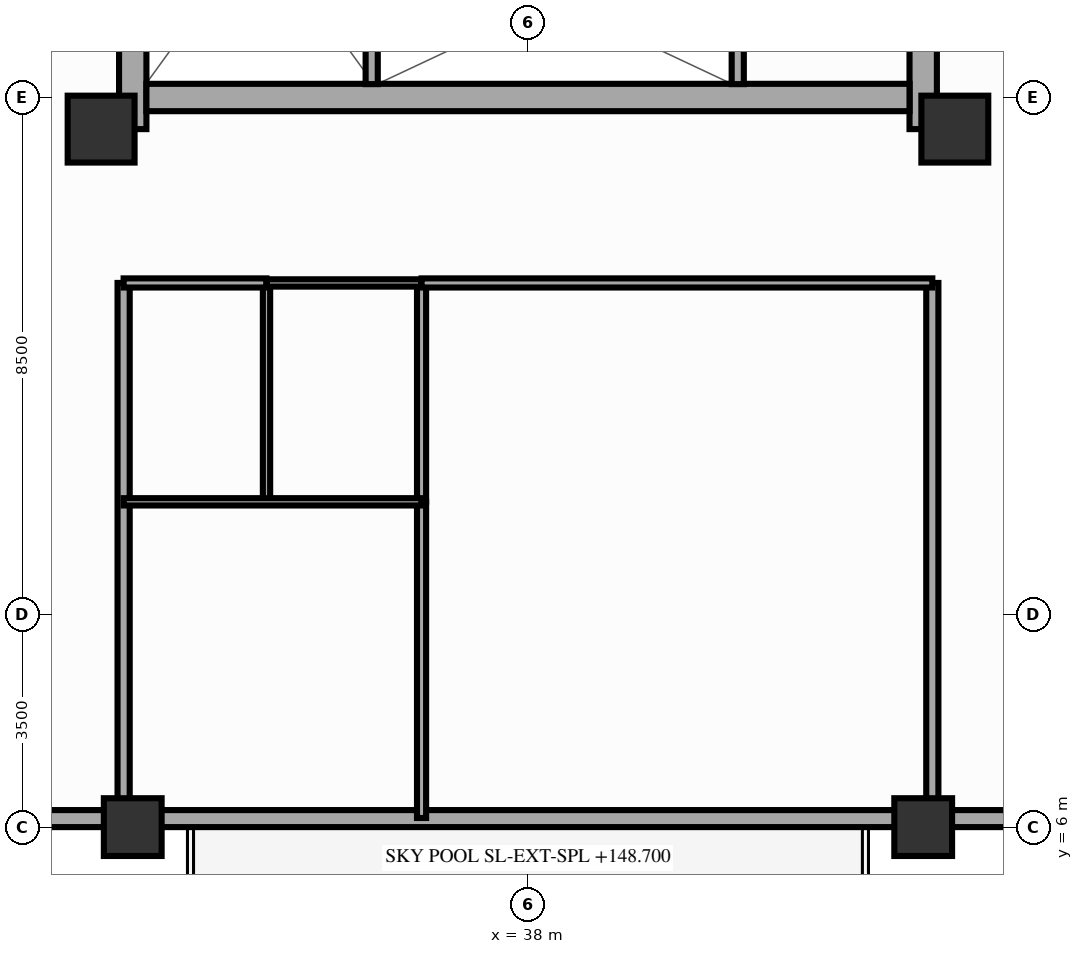
"""IFC4 building model, lengths in metres.
Left out: names, types, materials, properties, quantities, classifications, styles, units other than length and angle.
Written with IfcOpenShell. Run it as: python <this file> out.ifc"""

import sys

from ifc_helpers import new_model, si_unit, direction, frame, frame_2d, origin, origin_2d, place, context, subcontext, project, spatial, rectangle, extrude, source, transform, mapped, element, fill, save


model = new_model("IFC4")
c1 = context("Model", 3, precision=1e-05, world=origin(), true_north=direction((0.0, 1.0)))
c2 = subcontext(c1, "Body", "Model", "MODEL_VIEW")
j1 = project(units=[si_unit("LENGTHUNIT", "METRE"), si_unit("PLANEANGLEUNIT", "RADIAN")], contexts=[c1])
p1 = place(None, origin())
s1 = spatial("IfcSite", under=j1, at=p1, CompositionType="ELEMENT")
p2 = place(p1, origin())
s2 = spatial("IfcBuilding", under=s1, at=p2, CompositionType="ELEMENT")
p3 = place(p2, frame((0.0, 0.0, 148.7)))
s3 = spatial("IfcBuildingStorey", under=s2, at=p3, CompositionType="ELEMENT", Elevation=148.7)
p4 = place(p3, frame((31.5, 17.48, 0.0), z_axis=(0.0, 0.0, 1.0), x_axis=(0.0, 1.0, 0.0)))
e1 = element("IfcWall", 1, at=p4, inside=s3, PredefinedType="SHEAR", context=c2, shape_type="SweptSolid", body=[
    extrude(rectangle(XDim=19.04, YDim=0.45, at=frame_2d((9.52, 0.0))), origin(), (0.0, 0.0, 1.0), 3.5),
])
p5 = place(p4, frame((6.32, 0.0, 0.0)))
e2 = element("IfcOpeningElement", 2, at=p5, cuts=e1, PredefinedType="OPENING", context=c2, shape_type="SweptSolid", body=[
    extrude(rectangle(XDim=1.1, YDim=2.15, at=frame_2d((0.55, 1.075))), frame((0.0, 0.237, 0.0), z_axis=(0.0, -1.0, 0.0), x_axis=(1.0, 0.0, 0.0)), (0.0, 0.0, 1.0), 0.474),
])
p6 = place(p3, frame((44.5, 17.48, 0.0), z_axis=(0.0, 0.0, 1.0), x_axis=(0.0, 1.0, 0.0)))
e3 = element("IfcWall", 3, at=p6, inside=s3, PredefinedType="SHEAR", context=c2, shape_type="SweptSolid", body=[
    extrude(rectangle(XDim=19.04, YDim=0.45, at=frame_2d((9.52, 0.0))), origin(), (0.0, 0.0, 1.0), 3.5),
])
p7 = place(p6, frame((12.67, 0.0, 0.0), z_axis=(0.0, 0.0, 1.0), x_axis=(-1.0, 0.0, 0.0)))
e4 = element("IfcOpeningElement", 4, at=p7, cuts=e3, PredefinedType="OPENING", context=c2, shape_type="SweptSolid", body=[
    extrude(rectangle(XDim=1.1, YDim=2.15, at=frame_2d((0.55, 1.075))), frame((0.0, 0.237, 0.0), z_axis=(0.0, -1.0, 0.0), x_axis=(1.0, 0.0, 0.0)), (0.0, 0.0, 1.0), 0.474),
])
p8 = place(p3, frame((31.725, 18.0, 0.0), z_axis=(0.0, 0.0, 1.0), x_axis=(1.0, 0.0, 0.0)))
e5 = element("IfcWall", 5, at=p8, inside=s3, PredefinedType="SHEAR", context=c2, shape_type="SweptSolid", body=[
    extrude(rectangle(XDim=12.55, YDim=0.45, at=frame_2d((6.275, 0.0))), origin(), (0.0, 0.0, 1.0), 3.5),
])
m1 = source(origin(), c2, "Body", "SweptSolid", [
    extrude(rectangle(XDim=1.1, YDim=1.1, at=origin_2d()), origin(), (0.0, 0.0, 1.0), 3.5),
])
for number, where, z_axis, x_axis in (
    (6, (30.98, 17.48, 0.0), (0.0, 0.0, 1.0), (1.0, 0.0, 0.0)),
    (7, (45.02, 17.48, 0.0), (0.0, 0.0, 1.0), (1.0, 0.0, 0.0)),
):
    element("IfcColumn", number, at=place(p3, frame(where, z_axis=z_axis, x_axis=x_axis)), inside=s3, PredefinedType="COLUMN", context=c2, shape_type="MappedRepresentation", body=[
        mapped(m1, transform((0.0, 0.0, 0.0), scale=1.0)),
    ])
m2 = source(origin(), c2, "Body", "SweptSolid", [
    extrude(rectangle(XDim=0.95, YDim=0.95, at=origin_2d()), origin(), (0.0, 0.0, 1.0), 3.5),
])
for number, where, z_axis, x_axis in (
    (8, (31.5, 6.0, 0.0), (0.0, 0.0, 1.0), (1.0, 0.0, 0.0)),
    (9, (44.5, 6.0, 0.0), (0.0, 0.0, 1.0), (1.0, 0.0, 0.0)),
):
    element("IfcColumn", number, at=place(p3, frame(where, z_axis=z_axis, x_axis=x_axis)), inside=s3, PredefinedType="COLUMN", context=c2, shape_type="MappedRepresentation", body=[
        mapped(m2, transform((0.0, 0.0, 0.0), scale=1.0)),
    ])
p9 = place(p3, frame((21.0, 6.14, 0.0), z_axis=(0.0, 0.0, 1.0), x_axis=(1.0, 0.0, 0.0)))
e10 = element("IfcWall", 10, at=p9, inside=s3, PredefinedType="SOLIDWALL", context=c2, shape_type="SweptSolid", body=[
    extrude(rectangle(XDim=34.0, YDim=0.28, at=frame_2d((17.0, 0.0))), origin(), (0.0, 0.0, 1.0), 2.39),
])
p10 = place(p9, frame((4.65, 0.0, 0.25)))
e11 = element("IfcOpeningElement", 11, at=p10, cuts=e10, PredefinedType="OPENING", context=c2, shape_type="SweptSolid", body=[
    extrude(rectangle(XDim=1.2, YDim=1.5, at=frame_2d((0.6, 0.75))), frame((0.0, 0.152, 0.0), z_axis=(0.0, -1.0, 0.0), x_axis=(1.0, 0.0, 0.0)), (0.0, 0.0, 1.0), 0.304),
])
p11 = place(p9, frame((12.433, 0.0, 0.25)))
e12 = element("IfcOpeningElement", 12, at=p11, cuts=e10, PredefinedType="OPENING", context=c2, shape_type="SweptSolid", body=[
    extrude(rectangle(XDim=1.2, YDim=1.5, at=frame_2d((0.6, 0.75))), frame((0.0, 0.152, 0.0), z_axis=(0.0, -1.0, 0.0), x_axis=(1.0, 0.0, 0.0)), (0.0, 0.0, 1.0), 0.304),
])
p12 = place(p9, frame((18.617, 0.0, 0.25)))
e13 = element("IfcOpeningElement", 13, at=p12, cuts=e10, PredefinedType="OPENING", context=c2, shape_type="SweptSolid", body=[
    extrude(rectangle(XDim=1.2, YDim=1.5, at=frame_2d((0.6, 0.75))), frame((0.0, 0.152, 0.0), z_axis=(0.0, -1.0, 0.0), x_axis=(1.0, 0.0, 0.0)), (0.0, 0.0, 1.0), 0.304),
])
p13 = place(p9, frame((28.15, 0.0, 0.25)))
e14 = element("IfcOpeningElement", 14, at=p13, cuts=e10, PredefinedType="OPENING", context=c2, shape_type="SweptSolid", body=[
    extrude(rectangle(XDim=1.2, YDim=1.5, at=frame_2d((0.6, 0.75))), frame((0.0, 0.152, 0.0), z_axis=(0.0, -1.0, 0.0), x_axis=(1.0, 0.0, 0.0)), (0.0, 0.0, 1.0), 0.304),
])
p14 = place(p9, frame((21.7, 0.0, 0.0), z_axis=(0.0, 0.0, 1.0), x_axis=(-1.0, 0.0, 0.0)))
e15 = element("IfcOpeningElement", 15, at=p14, cuts=e10, PredefinedType="OPENING", context=c2, shape_type="SweptSolid", body=[
    extrude(rectangle(XDim=1.1, YDim=2.15, at=frame_2d((0.55, 1.075))), frame((0.0, 0.152, 0.0), z_axis=(0.0, -1.0, 0.0), x_axis=(1.0, 0.0, 0.0)), (0.0, 0.0, 1.0), 0.304),
])
p15 = place(p3, frame((41.45, 18.22, 0.0), z_axis=(0.0, 0.0, 1.0), x_axis=(0.0, 1.0, 0.0)))
e16 = element("IfcWall", 16, at=p15, inside=s3, PredefinedType="PARTITIONING", context=c2, shape_type="SweptSolid", body=[
    extrude(rectangle(XDim=2.96, YDim=0.2, at=frame_2d((1.48, 0.0))), origin(), (0.0, 0.0, 1.0), 3.16),
])
p16 = place(p3, frame((35.43, 18.22, 0.0), z_axis=(0.0, 0.0, 1.0), x_axis=(0.0, 1.0, 0.0)))
e17 = element("IfcWall", 17, at=p16, inside=s3, PredefinedType="SOLIDWALL", context=c2, shape_type="SweptSolid", body=[
    extrude(rectangle(XDim=7.22, YDim=0.2, at=frame_2d((3.61, 0.0))), origin(), (0.0, 0.0, 1.0), 3.29),
])
p17 = place(p16, frame((6.68, 0.0, 0.0), z_axis=(0.0, 0.0, 1.0), x_axis=(-1.0, 0.0, 0.0)))
e18 = element("IfcOpeningElement", 18, at=p17, cuts=e17, PredefinedType="OPENING", context=c2, shape_type="SweptSolid", body=[
    extrude(rectangle(XDim=1.1, YDim=2.15, at=frame_2d((0.55, 1.075))), frame((0.0, 0.112, 0.0), z_axis=(0.0, -1.0, 0.0), x_axis=(1.0, 0.0, 0.0)), (0.0, 0.0, 1.0), 0.224),
])
for number, where, z_axis, x_axis in (
    (19, (31.35, 14.95, 0.0), (0.0, 0.0, 1.0), (0.0, -1.0, 0.0)),
    (20, (44.65, 14.95, 0.0), (0.0, 0.0, 1.0), (0.0, -1.0, 0.0)),
):
    element("IfcWall", number, at=place(p3, frame(where, z_axis=z_axis, x_axis=x_axis)), inside=s3, PredefinedType="PARTITIONING", context=c2, shape_type="SweptSolid", body=[
        extrude(rectangle(XDim=8.8, YDim=0.2, at=frame_2d((4.4, 0.0))), origin(), (0.0, 0.0, 1.0), 2.39),
    ])
p18 = place(p3, frame((33.7, 14.95, 0.0), z_axis=(0.0, 0.0, 1.0), x_axis=(0.0, -1.0, 0.0)))
e21 = element("IfcWall", 21, at=p18, inside=s3, PredefinedType="PARTITIONING", context=c2, shape_type="SweptSolid", body=[
    extrude(rectangle(XDim=3.6, YDim=0.12, at=frame_2d((1.8, 0.0))), origin(), (0.0, 0.0, 1.0), 3.16),
])
p19 = place(p3, frame((36.25, 14.95, 0.0), z_axis=(0.0, 0.0, 1.0), x_axis=(0.0, -1.0, 0.0)))
e22 = element("IfcWall", 22, at=p19, inside=s3, PredefinedType="PARTITIONING", context=c2, shape_type="SweptSolid", body=[
    extrude(rectangle(XDim=3.6, YDim=0.15, at=frame_2d((1.8, 0.0))), origin(), (0.0, 0.0, 1.0), 3.16),
])
p20 = place(p3, frame((36.25, 11.35, 0.0), z_axis=(0.0, 0.0, 1.0), x_axis=(0.0, -1.0, 0.0)))
e23 = element("IfcWall", 23, at=p20, inside=s3, PredefinedType="PARTITIONING", context=c2, shape_type="SweptSolid", body=[
    extrude(rectangle(XDim=5.2, YDim=0.15, at=frame_2d((2.6, 0.0))), origin(), (0.0, 0.0, 1.0), 3.16),
])
p21 = place(p20, frame((2.15, 0.0, 0.0)))
e24 = element("IfcOpeningElement", 24, at=p21, cuts=e23, PredefinedType="OPENING", context=c2, shape_type="SweptSolid", body=[
    extrude(rectangle(XDim=0.9, YDim=2.1, at=frame_2d((0.45, 1.05))), frame((0.0, 0.087, 0.0), z_axis=(0.0, -1.0, 0.0), x_axis=(1.0, 0.0, 0.0)), (0.0, 0.0, 1.0), 0.174),
])
p22 = place(p3, frame((31.35, 11.35, 0.0), z_axis=(0.0, 0.0, 1.0), x_axis=(1.0, 0.0, 0.0)))
e25 = element("IfcWall", 25, at=p22, inside=s3, PredefinedType="PARTITIONING", context=c2, shape_type="SweptSolid", body=[
    extrude(rectangle(XDim=4.9, YDim=0.12, at=frame_2d((2.45, 0.0))), origin(), (0.0, 0.0, 1.0), 2.89),
])
p23 = place(p3, frame((31.35, 14.95, 0.0), z_axis=(0.0, 0.0, 1.0), x_axis=(1.0, 0.0, 0.0)))
e26 = element("IfcWall", 26, at=p23, inside=s3, PredefinedType="PARTITIONING", context=c2, shape_type="SweptSolid", body=[
    extrude(rectangle(XDim=2.35, YDim=0.15, at=frame_2d((1.175, 0.0))), origin(), (0.0, 0.0, 1.0), 3.16),
])
p24 = place(p23, frame((0.725, 0.0, 0.0)))
e27 = element("IfcOpeningElement", 27, at=p24, cuts=e26, PredefinedType="OPENING", context=c2, shape_type="SweptSolid", body=[
    extrude(rectangle(XDim=0.9, YDim=2.1, at=frame_2d((0.45, 1.05))), frame((0.0, 0.087, 0.0), z_axis=(0.0, -1.0, 0.0), x_axis=(1.0, 0.0, 0.0)), (0.0, 0.0, 1.0), 0.174),
])
p25 = place(p3, frame((33.7, 14.95, 0.0), z_axis=(0.0, 0.0, 1.0), x_axis=(1.0, 0.0, 0.0)))
e28 = element("IfcWall", 28, at=p25, inside=s3, PredefinedType="PARTITIONING", context=c2, shape_type="SweptSolid", body=[
    extrude(rectangle(XDim=2.55, YDim=0.12, at=frame_2d((1.275, 0.0))), origin(), (0.0, 0.0, 1.0), 3.16),
])
p26 = place(p25, frame((0.775, 0.0, 0.0)))
e29 = element("IfcOpeningElement", 29, at=p26, cuts=e28, PredefinedType="OPENING", context=c2, shape_type="SweptSolid", body=[
    extrude(rectangle(XDim=1.0, YDim=2.1, at=frame_2d((0.5, 1.05))), frame((0.0, 0.072, 0.0), z_axis=(0.0, -1.0, 0.0), x_axis=(1.0, 0.0, 0.0)), (0.0, 0.0, 1.0), 0.144),
])
p27 = place(p3, frame((36.25, 14.95, 0.0), z_axis=(0.0, 0.0, 1.0), x_axis=(1.0, 0.0, 0.0)))
e30 = element("IfcWall", 30, at=p27, inside=s3, PredefinedType="PARTITIONING", context=c2, shape_type="SweptSolid", body=[
    extrude(rectangle(XDim=8.4, YDim=0.15, at=frame_2d((4.2, 0.0))), origin(), (0.0, 0.0, 1.0), 3.16),
])
p28 = place(p27, frame((3.367, 0.0, 0.0)))
e31 = element("IfcOpeningElement", 31, at=p28, cuts=e30, PredefinedType="OPENING", context=c2, shape_type="SweptSolid", body=[
    extrude(rectangle(XDim=1.1, YDim=2.15, at=frame_2d((0.55, 1.075))), frame((0.0, 0.087, 0.0), z_axis=(0.0, -1.0, 0.0), x_axis=(1.0, 0.0, 0.0)), (0.0, 0.0, 1.0), 0.174),
])
m3 = source(origin(), c2, "Body", "SweptSolid", [
    extrude(rectangle(XDim=1.2, YDim=1.5, at=frame_2d((0.6, 0.75))), frame((0.0, 0.03, 0.0), z_axis=(0.0, -1.0, 0.0), x_axis=(1.0, 0.0, 0.0)), (0.0, 0.0, 1.0), 0.06),
])
p29 = place(p11, origin())
e32 = element("IfcWindow", 32, at=p29, inside=s3, PartitioningType="SINGLE_PANEL", PredefinedType="WINDOW", context=c2, shape_type="MappedRepresentation", body=[
    mapped(m3, transform((0.0, 0.0, 0.0), scale=1.0)),
])
fill(e12, e32)
p30 = place(p12, origin())
e33 = element("IfcWindow", 33, at=p30, inside=s3, PartitioningType="SINGLE_PANEL", PredefinedType="WINDOW", context=c2, shape_type="MappedRepresentation", body=[
    mapped(m3, transform((0.0, 0.0, 0.0), scale=1.0)),
])
fill(e13, e33)
m4 = source(origin(), c2, "Body", "SweptSolid", [
    extrude(rectangle(XDim=1.1, YDim=2.15, at=frame_2d((0.55, 1.075))), frame((0.0, 0.025, 0.0), z_axis=(0.0, -1.0, 0.0), x_axis=(1.0, 0.0, 0.0)), (0.0, 0.0, 1.0), 0.05),
])
p31 = place(p14, origin())
e34 = element("IfcDoor", 34, at=p31, inside=s3, OperationType="SINGLE_SWING_LEFT", PredefinedType="DOOR", context=c2, shape_type="MappedRepresentation", body=[
    mapped(m4, transform((0.0, 0.0, 0.0), scale=1.0)),
])
fill(e15, e34)
m5 = source(origin(), c2, "Body", "SweptSolid", [
    extrude(rectangle(XDim=0.9, YDim=2.1, at=frame_2d((0.45, 1.05))), frame((0.0, 0.025, 0.0), z_axis=(0.0, -1.0, 0.0), x_axis=(1.0, 0.0, 0.0)), (0.0, 0.0, 1.0), 0.05),
])
p32 = place(p21, origin())
e35 = element("IfcDoor", 35, at=p32, inside=s3, OperationType="SINGLE_SWING_RIGHT", PredefinedType="DOOR", context=c2, shape_type="MappedRepresentation", body=[
    mapped(m5, transform((0.0, 0.0, 0.0), scale=1.0)),
])
fill(e24, e35)
p33 = place(p24, origin())
e36 = element("IfcDoor", 36, at=p33, inside=s3, OperationType="SINGLE_SWING_LEFT", PredefinedType="DOOR", context=c2, shape_type="MappedRepresentation", body=[
    mapped(m5, transform((0.0, 0.0, 0.0), scale=1.0)),
])
fill(e27, e36)
m6 = source(origin(), c2, "Body", "SweptSolid", [
    extrude(rectangle(XDim=1.0, YDim=2.1, at=frame_2d((0.5, 1.05))), frame((0.0, 0.025, 0.0), z_axis=(0.0, -1.0, 0.0), x_axis=(1.0, 0.0, 0.0)), (0.0, 0.0, 1.0), 0.05),
])
p34 = place(p26, origin())
e37 = element("IfcDoor", 37, at=p34, inside=s3, OperationType="SINGLE_SWING_RIGHT", PredefinedType="DOOR", context=c2, shape_type="MappedRepresentation", body=[
    mapped(m6, transform((0.0, 0.0, 0.0), scale=1.0)),
])
fill(e29, e37)
p35 = place(p28, origin())
e38 = element("IfcDoor", 38, at=p35, inside=s3, OperationType="SINGLE_SWING_LEFT", PredefinedType="DOOR", context=c2, shape_type="MappedRepresentation", body=[
    mapped(m4, transform((0.0, 0.0, 0.0), scale=1.0)),
])
fill(e31, e38)
save(model, sys.argv[1])
